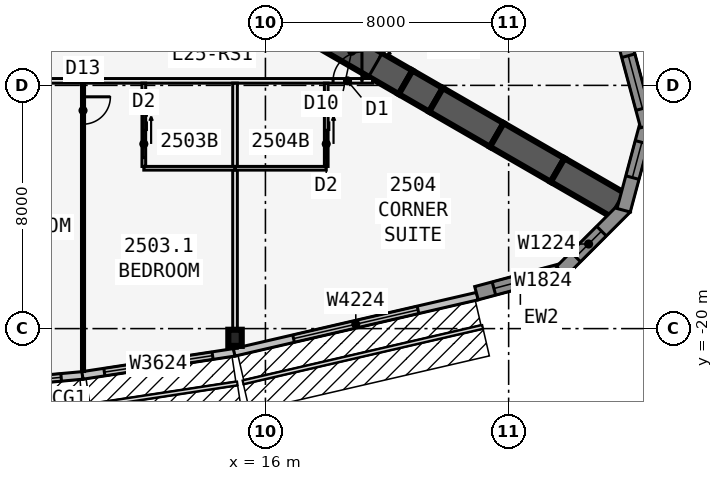
"""IFC4 building model, lengths in metres.
Left out: names, types, materials, properties, quantities, classifications, styles, units other than length and angle.
Written with IfcOpenShell. Run it as: python <this file> out.ifc"""

import sys

from ifc_helpers import new_model, si_unit, direction, frame, frame_2d, origin, origin_2d, place, context, subcontext, project, spatial, polyline, rectangle, i_section, outline, extrude, element, fill, save


model = new_model("IFC4")
c1 = context("Model", 3, precision=1e-05, world=origin(), true_north=direction((0.0, 1.0)))
c2 = subcontext(c1, "Body", "Model", "MODEL_VIEW")
j1 = project(units=[si_unit("LENGTHUNIT", "METRE"), si_unit("PLANEANGLEUNIT", "RADIAN")], contexts=[c1])
p1 = place(None, origin())
s1 = spatial("IfcSite", under=j1, at=p1, CompositionType="ELEMENT")
p2 = place(p1, origin())
s2 = spatial("IfcBuilding", under=s1, at=p2, CompositionType="ELEMENT")
p3 = place(p2, frame((0.0, 0.0, 96.5)))
s3 = spatial("IfcBuildingStorey", under=s2, at=p3, CompositionType="ELEMENT", Elevation=96.5)
p4 = place(p3, frame((16.5, -9.526, 0.0), z_axis=(0.0, 0.0, 1.0), x_axis=(0.866031398331, -0.499989616998, 0.0)))
e1 = element("IfcWall", 1, at=p4, inside=s3, PredefinedType="SHEAR", context=c2, shape_type="SweptSolid", body=[
    extrude(rectangle(XDim=4.746, YDim=0.9, at=frame_2d((2.373, 0.0))), origin(), (0.0, 0.0, 1.0), 3.4),
])
p5 = place(p4, frame((1.8, 0.0, 0.0)))
e2 = element("IfcOpeningElement", 2, at=p5, cuts=e1, PredefinedType="OPENING", context=c2, shape_type="SweptSolid", body=[
    extrude(rectangle(XDim=1.8, YDim=2.13, at=frame_2d((0.9, 1.065))), frame((0.0, 0.46, 0.0), z_axis=(0.0, -1.0, 0.0), x_axis=(1.0, 0.0, 0.0)), (0.0, 0.0, 1.0), 0.92),
])
p6 = place(p3, frame((20.61, -11.899, 0.0), z_axis=(0.0, 0.0, 1.0), x_axis=(0.866009537788, -0.500027479704, 0.0)))
e3 = element("IfcWall", 3, at=p6, inside=s3, PredefinedType="SHEAR", context=c2, shape_type="SweptSolid", body=[
    extrude(rectangle(XDim=1.155, YDim=0.9, at=frame_2d((0.577, 0.0))), origin(), (0.0, 0.0, 1.0), 3.4),
])
for number, where, z_axis, x_axis in (
    (4, (21.61, -12.477, 0.0), (0.0, 0.0, 1.0), (0.866, -0.5, 0.0)),
    (5, (23.61, -13.631, 0.0), (0.0, 0.0, 1.0), (0.866, -0.5, 0.0)),
    (6, (25.61, -14.786, 0.0), (0.0, 0.0, 1.0), (0.866, -0.5, 0.0)),
):
    element("IfcWall", number, at=place(p3, frame(where, z_axis=z_axis, x_axis=x_axis)), inside=s3, PredefinedType="SHEAR", context=c2, shape_type="SweptSolid", body=[
        extrude(rectangle(XDim=2.309, YDim=0.9, at=frame_2d((1.155, 0.0))), origin(), (0.0, 0.0, 1.0), 3.4),
    ])
p7 = place(p3, frame((15.0, -20.303, 0.0), z_axis=(0.0, 0.0, 1.0), x_axis=(1.0, 0.0, 0.0)))
e7 = element("IfcColumn", 7, at=p7, inside=s3, PredefinedType="COLUMN", context=c2, shape_type="SweptSolid", body=[
    extrude(i_section(OverallWidth=0.442, OverallDepth=0.531, WebThickness=0.066, FlangeThickness=0.106, at=origin_2d()), origin(), (0.0, 0.0, 1.0), 3.4),
])
p8 = place(p3, frame((4.989, -21.996, 0.0), z_axis=(0.0, 0.0, 1.0), x_axis=(0.995857256774, 0.090930325692, 0.0)))
e8 = element("IfcWall", 8, at=p8, inside=s3, PredefinedType="STANDARD", context=c2, shape_type="SweptSolid", body=[
    extrude(rectangle(XDim=5.021, YDim=0.25, at=frame_2d((2.51, 0.0))), origin(), (0.0, 0.0, 1.0), 3.235),
])
p9 = place(p8, frame((0.71, 0.0, 0.45)))
e9 = element("IfcOpeningElement", 9, at=p9, cuts=e8, PredefinedType="OPENING", context=c2, shape_type="SweptSolid", body=[
    extrude(rectangle(XDim=3.6, YDim=2.4, at=frame_2d((1.8, 1.2))), frame((0.0, 0.135, 0.0), z_axis=(0.0, -1.0, 0.0), x_axis=(1.0, 0.0, 0.0)), (0.0, 0.0, 1.0), 0.27),
])
p10 = place(p3, frame((9.981, -21.54, 0.0), z_axis=(0.0, 0.0, 1.0), x_axis=(0.988615403399, 0.150464561152, 0.0)))
e10 = element("IfcWall", 10, at=p10, inside=s3, PredefinedType="STANDARD", context=c2, shape_type="SweptSolid", body=[
    extrude(rectangle(XDim=5.058, YDim=0.25, at=frame_2d((2.529, 0.0))), origin(), (0.0, 0.0, 1.0), 3.235),
])
p11 = place(p10, frame((0.729, 0.0, 0.45)))
e11 = element("IfcOpeningElement", 11, at=p11, cuts=e10, PredefinedType="OPENING", context=c2, shape_type="SweptSolid", body=[
    extrude(rectangle(XDim=3.6, YDim=2.4, at=frame_2d((1.8, 1.2))), frame((0.0, 0.135, 0.0), z_axis=(0.0, -1.0, 0.0), x_axis=(1.0, 0.0, 0.0)), (0.0, 0.0, 1.0), 0.27),
])
p12 = place(p3, frame((14.972, -20.781, 0.0), z_axis=(0.0, 0.0, 1.0), x_axis=(0.974279327392, 0.225343720163, 0.0)))
e12 = element("IfcWall", 12, at=p12, inside=s3, PredefinedType="STANDARD", context=c2, shape_type="SweptSolid", body=[
    extrude(rectangle(XDim=8.211, YDim=0.25, at=frame_2d((4.105, 0.0))), origin(), (0.0, 0.0, 1.0), 3.235),
])
p13 = place(p12, frame((2.006, 0.0, 0.45)))
e13 = element("IfcOpeningElement", 13, at=p13, cuts=e12, PredefinedType="OPENING", context=c2, shape_type="SweptSolid", body=[
    extrude(rectangle(XDim=4.2, YDim=2.4, at=frame_2d((2.1, 1.2))), frame((0.0, 0.135, 0.0), z_axis=(0.0, -1.0, 0.0), x_axis=(1.0, 0.0, 0.0)), (0.0, 0.0, 1.0), 0.27),
])
p14 = place(p3, frame((22.942, -18.835, 0.0), z_axis=(0.0, 0.0, 1.0), x_axis=(0.965930548995, 0.258801419081, 0.0)))
e14 = element("IfcWall", 14, at=p14, inside=s3, PredefinedType="SOLIDWALL", context=c2, shape_type="SweptSolid", body=[
    extrude(rectangle(XDim=2.989, YDim=0.45, at=frame_2d((1.494, 0.0))), origin(), (0.0, 0.0, 1.0), 3.235),
])
p15 = place(p14, frame((0.594, 0.0, 0.45)))
e15 = element("IfcOpeningElement", 15, at=p15, cuts=e14, PredefinedType="OPENING", context=c2, shape_type="SweptSolid", body=[
    extrude(rectangle(XDim=1.8, YDim=2.4, at=frame_2d((0.9, 1.2))), frame((0.0, 0.235, 0.0), z_axis=(0.0, -1.0, 0.0), x_axis=(1.0, 0.0, 0.0)), (0.0, 0.0, 1.0), 0.47),
])
p16 = place(p3, frame((25.728, -18.12, 0.0), z_axis=(0.0, 0.0, 1.0), x_axis=(0.707025086683, 0.707188466253, 0.0)))
e16 = element("IfcWall", 16, at=p16, inside=s3, PredefinedType="SOLIDWALL", context=c2, shape_type="SweptSolid", body=[
    extrude(outline(polyline([(2.989, 0.225), (2.93, 0.225), (2.438, 0.093), (2.402, 0.225), (0.0, 0.225), (0.0, -0.225), (2.989, -0.225), (2.989, 0.225)])), origin(), (0.0, 0.0, 1.0), 3.235),
])
p17 = place(p16, frame((0.676, 0.0, 0.45)))
e17 = element("IfcOpeningElement", 17, at=p17, cuts=e16, PredefinedType="OPENING", context=c2, shape_type="SweptSolid", body=[
    extrude(rectangle(XDim=1.2, YDim=2.4, at=frame_2d((0.6, 1.2))), frame((0.0, 0.235, 0.0), z_axis=(0.0, -1.0, 0.0), x_axis=(1.0, 0.0, 0.0)), (0.0, 0.0, 1.0), 0.47),
])
p18 = place(p3, frame((27.783, -16.108, 0.0), z_axis=(0.0, 0.0, 1.0), x_axis=(0.258801419081, 0.965930548995, 0.0)))
e18 = element("IfcWall", 18, at=p18, inside=s3, PredefinedType="SOLIDWALL", context=c2, shape_type="SweptSolid", body=[
    extrude(outline(polyline([(2.989, 0.225), (0.586, 0.225), (0.551, 0.093), (0.06, 0.225), (0.0, 0.225), (0.0, -0.225), (2.989, -0.225), (2.989, 0.225)])), origin(), (0.0, 0.0, 1.0), 3.235),
])
p19 = place(p18, frame((1.113, 0.0, 0.45)))
e19 = element("IfcOpeningElement", 19, at=p19, cuts=e18, PredefinedType="OPENING", context=c2, shape_type="SweptSolid", body=[
    extrude(rectangle(XDim=1.2, YDim=2.4, at=frame_2d((0.6, 1.2))), frame((0.0, 0.235, 0.0), z_axis=(0.0, -1.0, 0.0), x_axis=(1.0, 0.0, 0.0)), (0.0, 0.0, 1.0), 0.47),
])
p20 = place(p3, frame((28.556, -13.337, 0.0), z_axis=(0.0, 0.0, 1.0), x_axis=(-0.258780998834, 0.965936019953, 0.0)))
e20 = element("IfcWall", 20, at=p20, inside=s3, PredefinedType="SOLIDWALL", context=c2, shape_type="SweptSolid", body=[
    extrude(rectangle(XDim=2.989, YDim=0.45, at=frame_2d((1.494, 0.0))), origin(), (0.0, 0.0, 1.0), 3.235),
])
p21 = place(p20, frame((0.594, 0.0, 0.45)))
e21 = element("IfcOpeningElement", 21, at=p21, cuts=e20, PredefinedType="OPENING", context=c2, shape_type="SweptSolid", body=[
    extrude(rectangle(XDim=1.8, YDim=2.4, at=frame_2d((0.9, 1.2))), frame((0.0, 0.235, 0.0), z_axis=(0.0, -1.0, 0.0), x_axis=(1.0, 0.0, 0.0)), (0.0, 0.0, 1.0), 0.47),
])
p22 = place(p3, frame((-19.527, -11.851, 0.0), z_axis=(0.0, 0.0, 1.0), x_axis=(1.0, 0.0, 0.0)))
e22 = element("IfcWall", 22, at=p22, inside=s3, PredefinedType="PARTITIONING", context=c2, shape_type="SweptSolid", body=[
    extrude(rectangle(XDim=39.054, YDim=0.15, at=frame_2d((19.527, 0.0))), origin(), (0.0, 0.0, 1.0), 3.235),
])
p23 = place(p22, frame((1.558, 0.0, 0.0)))
e23 = element("IfcOpeningElement", 23, at=p23, cuts=e22, PredefinedType="OPENING", context=c2, shape_type="SweptSolid", body=[
    extrude(rectangle(XDim=0.95, YDim=2.13, at=frame_2d((0.475, 1.065))), frame((0.0, 0.085, 0.0), z_axis=(0.0, -1.0, 0.0), x_axis=(1.0, 0.0, 0.0)), (0.0, 0.0, 1.0), 0.17),
])
p24 = place(p22, frame((11.552, 0.0, 0.0)))
e24 = element("IfcOpeningElement", 24, at=p24, cuts=e22, PredefinedType="OPENING", context=c2, shape_type="SweptSolid", body=[
    extrude(rectangle(XDim=0.95, YDim=2.13, at=frame_2d((0.475, 1.065))), frame((0.0, 0.085, 0.0), z_axis=(0.0, -1.0, 0.0), x_axis=(1.0, 0.0, 0.0)), (0.0, 0.0, 1.0), 0.17),
])
p25 = place(p22, frame((21.527, 0.0, 0.0)))
e25 = element("IfcOpeningElement", 25, at=p25, cuts=e22, PredefinedType="OPENING", context=c2, shape_type="SweptSolid", body=[
    extrude(rectangle(XDim=1.0, YDim=2.13, at=frame_2d((0.5, 1.065))), frame((0.0, 0.085, 0.0), z_axis=(0.0, -1.0, 0.0), x_axis=(1.0, 0.0, 0.0)), (0.0, 0.0, 1.0), 0.17),
])
p26 = place(p22, frame((26.552, 0.0, 0.0)))
e26 = element("IfcOpeningElement", 26, at=p26, cuts=e22, PredefinedType="OPENING", context=c2, shape_type="SweptSolid", body=[
    extrude(rectangle(XDim=0.95, YDim=2.13, at=frame_2d((0.475, 1.065))), frame((0.0, 0.085, 0.0), z_axis=(0.0, -1.0, 0.0), x_axis=(1.0, 0.0, 0.0)), (0.0, 0.0, 1.0), 0.17),
])
p27 = place(p22, frame((37.752, 0.0, 0.0)))
e27 = element("IfcOpeningElement", 27, at=p27, cuts=e22, PredefinedType="OPENING", context=c2, shape_type="SweptSolid", body=[
    extrude(rectangle(XDim=0.95, YDim=2.13, at=frame_2d((0.475, 1.065))), frame((0.0, 0.085, 0.0), z_axis=(0.0, -1.0, 0.0), x_axis=(1.0, 0.0, 0.0)), (0.0, 0.0, 1.0), 0.17),
])
p28 = place(p3, frame((10.0, -11.926, 0.0), z_axis=(0.0, 0.0, 1.0), x_axis=(0.0, -1.0, 0.0)))
e28 = element("IfcWall", 28, at=p28, inside=s3, PredefinedType="PARTITIONING", context=c2, shape_type="SweptSolid", body=[
    extrude(rectangle(XDim=9.485, YDim=0.1, at=frame_2d((4.742, 0.0))), origin(), (0.0, 0.0, 1.0), 2.389),
])
p29 = place(p28, frame((0.45, 0.0, 0.0)))
e29 = element("IfcOpeningElement", 29, at=p29, cuts=e28, PredefinedType="OPENING", context=c2, shape_type="SweptSolid", body=[
    extrude(rectangle(XDim=0.9, YDim=2.13, at=frame_2d((0.45, 1.065))), frame((0.0, 0.06, 0.0), z_axis=(0.0, -1.0, 0.0), x_axis=(1.0, 0.0, 0.0)), (0.0, 0.0, 1.0), 0.12),
])
p30 = place(p3, frame((15.0, -11.926, 0.0), z_axis=(0.0, 0.0, 1.0), x_axis=(0.0, -1.0, 0.0)))
e30 = element("IfcWall", 30, at=p30, inside=s3, PredefinedType="PARTITIONING", context=c2, shape_type="SweptSolid", body=[
    extrude(rectangle(XDim=8.72, YDim=0.15, at=frame_2d((4.36, 0.0))), origin(), (0.0, 0.0, 1.0), 2.389),
])
p31 = place(p3, frame((12.0, -14.726, 0.0), z_axis=(0.0, 0.0, 1.0), x_axis=(1.0, 0.0, 0.0)))
e31 = element("IfcWall", 31, at=p31, inside=s3, PredefinedType="PLUMBINGWALL", context=c2, shape_type="SweptSolid", body=[
    extrude(rectangle(XDim=3.0, YDim=0.12, at=frame_2d((1.5, 0.0))), origin(), (0.0, 0.0, 1.0), 3.235),
])
p32 = place(p3, frame((12.0, -11.926, 0.0), z_axis=(0.0, 0.0, 1.0), x_axis=(0.0, -1.0, 0.0)))
e32 = element("IfcWall", 32, at=p32, inside=s3, PredefinedType="PLUMBINGWALL", context=c2, shape_type="SweptSolid", body=[
    extrude(rectangle(XDim=2.74, YDim=0.12, at=frame_2d((1.37, 0.0))), origin(), (0.0, 0.0, 1.0), 3.235),
])
p33 = place(p32, frame((1.55, 0.0, 0.0)))
e33 = element("IfcOpeningElement", 33, at=p33, cuts=e32, PredefinedType="OPENING", context=c2, shape_type="SweptSolid", body=[
    extrude(rectangle(XDim=0.9, YDim=2.13, at=frame_2d((0.45, 1.065))), frame((0.0, 0.07, 0.0), z_axis=(0.0, -1.0, 0.0), x_axis=(1.0, 0.0, 0.0)), (0.0, 0.0, 1.0), 0.14),
])
p34 = place(p3, frame((15.0, -14.726, 0.0), z_axis=(0.0, 0.0, 1.0), x_axis=(1.0, 0.0, 0.0)))
e34 = element("IfcWall", 34, at=p34, inside=s3, PredefinedType="PLUMBINGWALL", context=c2, shape_type="SweptSolid", body=[
    extrude(rectangle(XDim=3.0, YDim=0.12, at=frame_2d((1.5, 0.0))), origin(), (0.0, 0.0, 1.0), 3.235),
])
p35 = place(p3, frame((18.0, -11.926, 0.0), z_axis=(0.0, 0.0, 1.0), x_axis=(0.0, -1.0, 0.0)))
e35 = element("IfcWall", 35, at=p35, inside=s3, PredefinedType="PLUMBINGWALL", context=c2, shape_type="SweptSolid", body=[
    extrude(rectangle(XDim=2.74, YDim=0.12, at=frame_2d((1.37, 0.0))), origin(), (0.0, 0.0, 1.0), 3.235),
])
p36 = place(p35, frame((1.55, 0.0, 0.0)))
e36 = element("IfcOpeningElement", 36, at=p36, cuts=e35, PredefinedType="OPENING", context=c2, shape_type="SweptSolid", body=[
    extrude(rectangle(XDim=0.9, YDim=2.13, at=frame_2d((0.45, 1.065))), frame((0.0, 0.07, 0.0), z_axis=(0.0, -1.0, 0.0), x_axis=(1.0, 0.0, 0.0)), (0.0, 0.0, 1.0), 0.14),
])
p37 = place(p3, frame((20.027, -10.985, 0.0), z_axis=(0.0, 0.0, 1.0), x_axis=(-0.500001677587, 0.866024435227, 0.0)))
e37 = element("IfcWall", 37, at=p37, inside=s3, PredefinedType="PARTITIONING", context=c2, shape_type="SweptSolid", body=[
    extrude(rectangle(XDim=39.054, YDim=0.15, at=frame_2d((19.527, 0.0))), origin(), (0.0, 0.0, 1.0), 3.235),
])
p38 = place(p37, frame((1.558, 0.0, 0.0)))
e38 = element("IfcOpeningElement", 38, at=p38, cuts=e37, PredefinedType="OPENING", context=c2, shape_type="SweptSolid", body=[
    extrude(rectangle(XDim=0.95, YDim=2.13, at=frame_2d((0.475, 1.065))), frame((0.0, 0.085, 0.0), z_axis=(0.0, -1.0, 0.0), x_axis=(1.0, 0.0, 0.0)), (0.0, 0.0, 1.0), 0.17),
])
p39 = place(p37, frame((11.552, 0.0, 0.0)))
e39 = element("IfcOpeningElement", 39, at=p39, cuts=e37, PredefinedType="OPENING", context=c2, shape_type="SweptSolid", body=[
    extrude(rectangle(XDim=0.95, YDim=2.13, at=frame_2d((0.475, 1.065))), frame((0.0, 0.085, 0.0), z_axis=(0.0, -1.0, 0.0), x_axis=(1.0, 0.0, 0.0)), (0.0, 0.0, 1.0), 0.17),
])
p40 = place(p37, frame((22.752, 0.0, 0.0)))
e40 = element("IfcOpeningElement", 40, at=p40, cuts=e37, PredefinedType="OPENING", context=c2, shape_type="SweptSolid", body=[
    extrude(rectangle(XDim=0.95, YDim=2.13, at=frame_2d((0.475, 1.065))), frame((0.0, 0.085, 0.0), z_axis=(0.0, -1.0, 0.0), x_axis=(1.0, 0.0, 0.0)), (0.0, 0.0, 1.0), 0.17),
])
p41 = place(p37, frame((36.546, 0.0, 0.0)))
e41 = element("IfcOpeningElement", 41, at=p41, cuts=e37, PredefinedType="OPENING", context=c2, shape_type="SweptSolid", body=[
    extrude(rectangle(XDim=0.95, YDim=2.13, at=frame_2d((0.475, 1.065))), frame((0.0, 0.085, 0.0), z_axis=(0.0, -1.0, 0.0), x_axis=(1.0, 0.0, 0.0)), (0.0, 0.0, 1.0), 0.17),
])
p42 = place(p9, origin())
e42 = element("IfcWindow", 42, at=p42, inside=s3, PartitioningType="SINGLE_PANEL", PredefinedType="WINDOW", context=c2, shape_type="SweptSolid", body=[
    extrude(rectangle(XDim=3.6, YDim=2.4, at=frame_2d((1.8, 1.2))), frame((0.0, 0.03, 0.0), z_axis=(0.0, -1.0, 0.0), x_axis=(1.0, 0.0, 0.0)), (0.0, 0.0, 1.0), 0.06),
])
fill(e9, e42)
p43 = place(p11, origin())
e43 = element("IfcWindow", 43, at=p43, inside=s3, PartitioningType="SINGLE_PANEL", PredefinedType="WINDOW", context=c2, shape_type="SweptSolid", body=[
    extrude(rectangle(XDim=3.6, YDim=2.4, at=frame_2d((1.8, 1.2))), frame((0.0, 0.03, 0.0), z_axis=(0.0, -1.0, 0.0), x_axis=(1.0, 0.0, 0.0)), (0.0, 0.0, 1.0), 0.06),
])
fill(e11, e43)
p44 = place(p13, origin())
e44 = element("IfcWindow", 44, at=p44, inside=s3, PartitioningType="SINGLE_PANEL", PredefinedType="WINDOW", context=c2, shape_type="SweptSolid", body=[
    extrude(rectangle(XDim=4.2, YDim=2.4, at=frame_2d((2.1, 1.2))), frame((0.0, 0.03, 0.0), z_axis=(0.0, -1.0, 0.0), x_axis=(1.0, 0.0, 0.0)), (0.0, 0.0, 1.0), 0.06),
])
fill(e13, e44)
p45 = place(p15, origin())
e45 = element("IfcWindow", 45, at=p45, inside=s3, PartitioningType="SINGLE_PANEL", PredefinedType="WINDOW", context=c2, shape_type="SweptSolid", body=[
    extrude(rectangle(XDim=1.8, YDim=2.4, at=frame_2d((0.9, 1.2))), frame((0.0, 0.03, 0.0), z_axis=(0.0, -1.0, 0.0), x_axis=(1.0, 0.0, 0.0)), (0.0, 0.0, 1.0), 0.06),
])
fill(e15, e45)
p46 = place(p17, origin())
e46 = element("IfcWindow", 46, at=p46, inside=s3, PartitioningType="SINGLE_PANEL", PredefinedType="WINDOW", context=c2, shape_type="SweptSolid", body=[
    extrude(rectangle(XDim=1.2, YDim=2.4, at=frame_2d((0.6, 1.2))), frame((0.0, 0.03, 0.0), z_axis=(0.0, -1.0, 0.0), x_axis=(1.0, 0.0, 0.0)), (0.0, 0.0, 1.0), 0.06),
])
fill(e17, e46)
p47 = place(p19, origin())
e47 = element("IfcWindow", 47, at=p47, inside=s3, PartitioningType="SINGLE_PANEL", PredefinedType="WINDOW", context=c2, shape_type="SweptSolid", body=[
    extrude(rectangle(XDim=1.2, YDim=2.4, at=frame_2d((0.6, 1.2))), frame((0.0, 0.03, 0.0), z_axis=(0.0, -1.0, 0.0), x_axis=(1.0, 0.0, 0.0)), (0.0, 0.0, 1.0), 0.06),
])
fill(e19, e47)
p48 = place(p21, origin())
e48 = element("IfcWindow", 48, at=p48, inside=s3, PartitioningType="SINGLE_PANEL", PredefinedType="WINDOW", context=c2, shape_type="SweptSolid", body=[
    extrude(rectangle(XDim=1.8, YDim=2.4, at=frame_2d((0.9, 1.2))), frame((0.0, 0.03, 0.0), z_axis=(0.0, -1.0, 0.0), x_axis=(1.0, 0.0, 0.0)), (0.0, 0.0, 1.0), 0.06),
])
fill(e21, e48)
p49 = place(p29, origin())
e49 = element("IfcDoor", 49, at=p49, inside=s3, OperationType="SINGLE_SWING_LEFT", PredefinedType="DOOR", context=c2, shape_type="SweptSolid", body=[
    extrude(rectangle(XDim=0.9, YDim=2.13, at=frame_2d((0.45, 1.065))), frame((0.0, 0.025, 0.0), z_axis=(0.0, -1.0, 0.0), x_axis=(1.0, 0.0, 0.0)), (0.0, 0.0, 1.0), 0.05),
])
fill(e29, e49)
p50 = place(p33, origin())
e50 = element("IfcDoor", 50, at=p50, inside=s3, OperationType="SLIDING_TO_LEFT", PredefinedType="DOOR", context=c2, shape_type="SweptSolid", body=[
    extrude(rectangle(XDim=0.9, YDim=2.13, at=frame_2d((0.45, 1.065))), frame((0.0, 0.025, 0.0), z_axis=(0.0, -1.0, 0.0), x_axis=(1.0, 0.0, 0.0)), (0.0, 0.0, 1.0), 0.05),
])
fill(e33, e50)
p51 = place(p36, origin())
e51 = element("IfcDoor", 51, at=p51, inside=s3, OperationType="SLIDING_TO_LEFT", PredefinedType="DOOR", context=c2, shape_type="SweptSolid", body=[
    extrude(rectangle(XDim=0.9, YDim=2.13, at=frame_2d((0.45, 1.065))), frame((0.0, 0.025, 0.0), z_axis=(0.0, -1.0, 0.0), x_axis=(1.0, 0.0, 0.0)), (0.0, 0.0, 1.0), 0.05),
])
fill(e36, e51)
p52 = place(p27, origin())
e52 = element("IfcDoor", 52, at=p52, inside=s3, OperationType="SINGLE_SWING_RIGHT", PredefinedType="DOOR", context=c2, shape_type="SweptSolid", body=[
    extrude(rectangle(XDim=0.95, YDim=2.13, at=frame_2d((0.475, 1.065))), frame((0.0, 0.025, 0.0), z_axis=(0.0, -1.0, 0.0), x_axis=(1.0, 0.0, 0.0)), (0.0, 0.0, 1.0), 0.05),
])
fill(e27, e52)
p53 = place(p5, origin())
e53 = element("IfcDoor", 53, at=p53, inside=s3, OperationType="DOUBLE_DOOR_DOUBLE_SWING", PredefinedType="DOOR", context=c2, shape_type="SweptSolid", body=[
    extrude(rectangle(XDim=1.8, YDim=2.13, at=frame_2d((0.9, 1.065))), frame((0.0, 0.025, 0.0), z_axis=(0.0, -1.0, 0.0), x_axis=(1.0, 0.0, 0.0)), (0.0, 0.0, 1.0), 0.05),
])
fill(e2, e53)
save(model, sys.argv[1])
